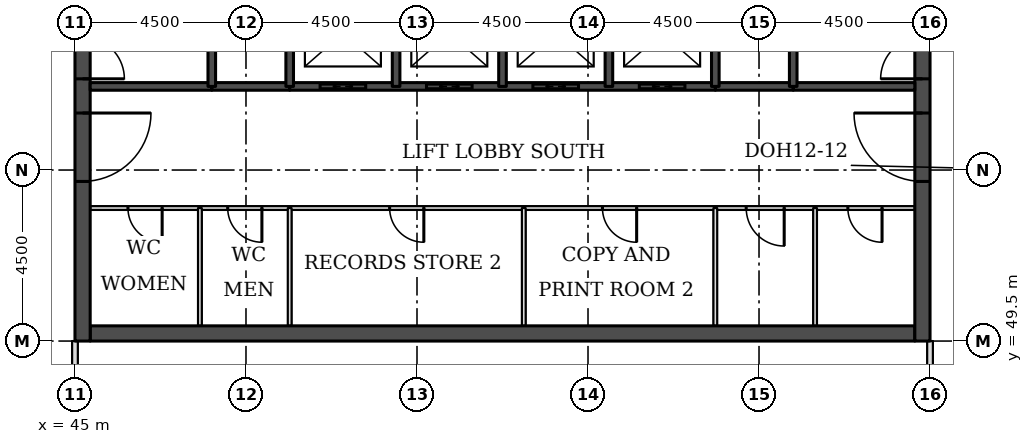
"""IFC4 building model, lengths in metres.
Left out: names, types, materials, properties, quantities, classifications, styles, units other than length and angle.
Written with IfcOpenShell. Run it as: python <this file> out.ifc"""

import sys

from ifc_helpers import new_model, si_unit, direction, frame, frame_2d, origin, place, context, subcontext, project, spatial, rectangle, extrude, element, fill, save


model = new_model("IFC4")
c1 = context("Model", 3, precision=1e-05, world=origin(), true_north=direction((0.0, 1.0)))
c2 = subcontext(c1, "Body", "Model", "MODEL_VIEW")
j1 = project(units=[si_unit("LENGTHUNIT", "METRE"), si_unit("PLANEANGLEUNIT", "RADIAN")], contexts=[c1])
p1 = place(None, origin())
s1 = spatial("IfcSite", under=j1, at=p1, CompositionType="ELEMENT")
p2 = place(p1, origin())
s2 = spatial("IfcBuilding", under=s1, at=p2, CompositionType="ELEMENT")
p3 = place(p2, frame((0.0, 0.0, 245.2)))
s3 = spatial("IfcBuildingStorey", under=s2, at=p3, CompositionType="ELEMENT", Elevation=245.2)
p4 = place(p3, frame((45.4, 49.7, 0.0), z_axis=(0.0, 0.0, 1.0), x_axis=(1.0, 0.0, 0.0)))
e1 = element("IfcWall", 1, at=p4, inside=s3, PredefinedType="SHEAR", context=c2, shape_type="SweptSolid", body=[
    extrude(rectangle(XDim=21.7, YDim=0.4, at=frame_2d((10.85, 0.0))), origin(), (0.0, 0.0, 1.0), 3.7),
])
p5 = place(p3, frame((45.2, 49.5, 0.0), z_axis=(0.0, 0.0, 1.0), x_axis=(0.0, 1.0, 0.0)))
e2 = element("IfcWall", 2, at=p5, inside=s3, PredefinedType="SHEAR", context=c2, shape_type="SweptSolid", body=[
    extrude(rectangle(XDim=22.5, YDim=0.4, at=frame_2d((11.25, 0.0))), origin(), (0.0, 0.0, 1.0), 3.7),
])
p6 = place(p5, frame((4.2, 0.0, 0.0)))
e3 = element("IfcOpeningElement", 3, at=p6, cuts=e2, PredefinedType="OPENING", context=c2, shape_type="SweptSolid", body=[
    extrude(rectangle(XDim=1.8, YDim=2.1, at=frame_2d((0.9, 1.05))), frame((0.0, 0.21, 0.0), z_axis=(0.0, -1.0, 0.0), x_axis=(1.0, 0.0, 0.0)), (0.0, 0.0, 1.0), 0.42),
])
p7 = place(p5, frame((6.9, 0.0, 0.0)))
e4 = element("IfcOpeningElement", 4, at=p7, cuts=e2, PredefinedType="OPENING", context=c2, shape_type="SweptSolid", body=[
    extrude(rectangle(XDim=1.1, YDim=2.1, at=frame_2d((0.55, 1.05))), frame((0.0, 0.21, 0.0), z_axis=(0.0, -1.0, 0.0), x_axis=(1.0, 0.0, 0.0)), (0.0, 0.0, 1.0), 0.42),
])
p8 = place(p5, frame((13.6, 0.0, 0.0)))
e5 = element("IfcOpeningElement", 5, at=p8, cuts=e2, PredefinedType="OPENING", context=c2, shape_type="SweptSolid", body=[
    extrude(rectangle(XDim=1.1, YDim=2.1, at=frame_2d((0.55, 1.05))), frame((0.0, 0.21, 0.0), z_axis=(0.0, -1.0, 0.0), x_axis=(1.0, 0.0, 0.0)), (0.0, 0.0, 1.0), 0.42),
])
p9 = place(p5, frame((16.5, 0.0, 0.0)))
e6 = element("IfcOpeningElement", 6, at=p9, cuts=e2, PredefinedType="OPENING", context=c2, shape_type="SweptSolid", body=[
    extrude(rectangle(XDim=1.8, YDim=2.1, at=frame_2d((0.9, 1.05))), frame((0.0, 0.21, 0.0), z_axis=(0.0, -1.0, 0.0), x_axis=(1.0, 0.0, 0.0)), (0.0, 0.0, 1.0), 0.42),
])
p10 = place(p3, frame((67.3, 49.5, 0.0), z_axis=(0.0, 0.0, 1.0), x_axis=(0.0, 1.0, 0.0)))
e7 = element("IfcWall", 7, at=p10, inside=s3, PredefinedType="SHEAR", context=c2, shape_type="SweptSolid", body=[
    extrude(rectangle(XDim=22.5, YDim=0.4, at=frame_2d((11.25, 0.0))), origin(), (0.0, 0.0, 1.0), 3.7),
])
p11 = place(p10, frame((4.2, 0.0, 0.0)))
e8 = element("IfcOpeningElement", 8, at=p11, cuts=e7, PredefinedType="OPENING", context=c2, shape_type="SweptSolid", body=[
    extrude(rectangle(XDim=1.8, YDim=2.1, at=frame_2d((0.9, 1.05))), frame((0.0, 0.21, 0.0), z_axis=(0.0, -1.0, 0.0), x_axis=(1.0, 0.0, 0.0)), (0.0, 0.0, 1.0), 0.42),
])
p12 = place(p10, frame((6.9, 0.0, 0.0)))
e9 = element("IfcOpeningElement", 9, at=p12, cuts=e7, PredefinedType="OPENING", context=c2, shape_type="SweptSolid", body=[
    extrude(rectangle(XDim=1.1, YDim=2.1, at=frame_2d((0.55, 1.05))), frame((0.0, 0.21, 0.0), z_axis=(0.0, -1.0, 0.0), x_axis=(1.0, 0.0, 0.0)), (0.0, 0.0, 1.0), 0.42),
])
p13 = place(p10, frame((13.6, 0.0, 0.0)))
e10 = element("IfcOpeningElement", 10, at=p13, cuts=e7, PredefinedType="OPENING", context=c2, shape_type="SweptSolid", body=[
    extrude(rectangle(XDim=1.1, YDim=2.1, at=frame_2d((0.55, 1.05))), frame((0.0, 0.21, 0.0), z_axis=(0.0, -1.0, 0.0), x_axis=(1.0, 0.0, 0.0)), (0.0, 0.0, 1.0), 0.42),
])
p14 = place(p10, frame((16.5, 0.0, 0.0)))
e11 = element("IfcOpeningElement", 11, at=p14, cuts=e7, PredefinedType="OPENING", context=c2, shape_type="SweptSolid", body=[
    extrude(rectangle(XDim=1.8, YDim=2.1, at=frame_2d((0.9, 1.05))), frame((0.0, 0.21, 0.0), z_axis=(0.0, -1.0, 0.0), x_axis=(1.0, 0.0, 0.0)), (0.0, 0.0, 1.0), 0.42),
])
p15 = place(p3, frame((67.5, 40.05, 0.0), z_axis=(0.0, 0.0, 1.0), x_axis=(0.0, 1.0, 0.0)))
e12 = element("IfcWall", 12, at=p15, inside=s3, PredefinedType="PARTITIONING", context=c2, shape_type="SweptSolid", body=[
    extrude(rectangle(XDim=9.45, YDim=0.15, at=frame_2d((4.725, 0.0))), origin(), (0.0, 0.0, 1.0), 3.022),
])
p16 = place(p3, frame((45.0, 48.0, 0.0), z_axis=(0.0, 0.0, 1.0), x_axis=(0.0, 1.0, 0.0)))
e13 = element("IfcWall", 13, at=p16, inside=s3, PredefinedType="PARTITIONING", context=c2, shape_type="SweptSolid", body=[
    extrude(rectangle(XDim=1.5, YDim=0.15, at=frame_2d((0.75, 0.0))), origin(), (0.0, 0.0, 1.0), 3.022),
])
p17 = place(p3, frame((45.4, 53.0, 0.0), z_axis=(0.0, 0.0, 1.0), x_axis=(1.0, 0.0, 0.0)))
e14 = element("IfcWall", 14, at=p17, inside=s3, PredefinedType="PARTITIONING", context=c2, shape_type="SweptSolid", body=[
    extrude(rectangle(XDim=21.7, YDim=0.1, at=frame_2d((10.85, 0.0))), origin(), (0.0, 0.0, 1.0), 3.55),
])
p18 = place(p17, frame((19.938, 0.0, 0.0)))
e15 = element("IfcOpeningElement", 15, at=p18, cuts=e14, PredefinedType="OPENING", context=c2, shape_type="SweptSolid", body=[
    extrude(rectangle(XDim=0.9, YDim=2.1, at=frame_2d((0.45, 1.05))), frame((0.0, 0.06, 0.0), z_axis=(0.0, -1.0, 0.0), x_axis=(1.0, 0.0, 0.0)), (0.0, 0.0, 1.0), 0.12),
])
p19 = place(p17, frame((17.262, 0.0, 0.0)))
e16 = element("IfcOpeningElement", 16, at=p19, cuts=e14, PredefinedType="OPENING", context=c2, shape_type="SweptSolid", body=[
    extrude(rectangle(XDim=1.0, YDim=2.1, at=frame_2d((0.5, 1.05))), frame((0.0, 0.06, 0.0), z_axis=(0.0, -1.0, 0.0), x_axis=(1.0, 0.0, 0.0)), (0.0, 0.0, 1.0), 0.12),
])
p20 = place(p17, frame((0.994, 0.0, 0.0)))
e17 = element("IfcOpeningElement", 17, at=p20, cuts=e14, PredefinedType="OPENING", context=c2, shape_type="SweptSolid", body=[
    extrude(rectangle(XDim=0.9, YDim=2.1, at=frame_2d((0.45, 1.05))), frame((0.0, 0.06, 0.0), z_axis=(0.0, -1.0, 0.0), x_axis=(1.0, 0.0, 0.0)), (0.0, 0.0, 1.0), 0.12),
])
p21 = place(p17, frame((3.619, 0.0, 0.0)))
e18 = element("IfcOpeningElement", 18, at=p21, cuts=e14, PredefinedType="OPENING", context=c2, shape_type="SweptSolid", body=[
    extrude(rectangle(XDim=0.9, YDim=2.1, at=frame_2d((0.45, 1.05))), frame((0.0, 0.06, 0.0), z_axis=(0.0, -1.0, 0.0), x_axis=(1.0, 0.0, 0.0)), (0.0, 0.0, 1.0), 0.12),
])
p22 = place(p17, frame((7.88, 0.0, 0.0)))
e19 = element("IfcOpeningElement", 19, at=p22, cuts=e14, PredefinedType="OPENING", context=c2, shape_type="SweptSolid", body=[
    extrude(rectangle(XDim=0.9, YDim=2.1, at=frame_2d((0.45, 1.05))), frame((0.0, 0.06, 0.0), z_axis=(0.0, -1.0, 0.0), x_axis=(1.0, 0.0, 0.0)), (0.0, 0.0, 1.0), 0.12),
])
p23 = place(p17, frame((13.48, 0.0, 0.0)))
e20 = element("IfcOpeningElement", 20, at=p23, cuts=e14, PredefinedType="OPENING", context=c2, shape_type="SweptSolid", body=[
    extrude(rectangle(XDim=0.9, YDim=2.1, at=frame_2d((0.45, 1.05))), frame((0.0, 0.06, 0.0), z_axis=(0.0, -1.0, 0.0), x_axis=(1.0, 0.0, 0.0)), (0.0, 0.0, 1.0), 0.12),
])
for number, where, z_axis, x_axis in (
    (21, (48.6, 56.2, 0.0), (0.0, 0.0, 1.0), (1.0, 0.0, 0.0)),
    (22, (61.85, 56.2, 0.0), (0.0, 0.0, 1.0), (1.0, 0.0, 0.0)),
):
    element("IfcWall", number, at=place(p3, frame(where, z_axis=z_axis, x_axis=x_axis)), inside=s3, PredefinedType="SOLIDWALL", context=c2, shape_type="SweptSolid", body=[
        extrude(rectangle(XDim=2.05, YDim=0.2, at=frame_2d((1.025, 0.0))), origin(), (0.0, 0.0, 1.0), 3.55),
    ])
p24 = place(p3, frame((45.4, 56.2, 0.0), z_axis=(0.0, 0.0, 1.0), x_axis=(1.0, 0.0, 0.0)))
e23 = element("IfcWall", 23, at=p24, inside=s3, PredefinedType="SOLIDWALL", context=c2, shape_type="SweptSolid", body=[
    extrude(rectangle(XDim=3.2, YDim=0.2, at=frame_2d((1.6, 0.0))), origin(), (0.0, 0.0, 1.0), 3.55),
])
p25 = place(p3, frame((50.65, 56.2, 0.0), z_axis=(0.0, 0.0, 1.0), x_axis=(1.0, 0.0, 0.0)))
e24 = element("IfcWall", 24, at=p25, inside=s3, PredefinedType="SOLIDWALL", context=c2, shape_type="SweptSolid", body=[
    extrude(rectangle(XDim=11.2, YDim=0.2, at=frame_2d((5.6, 0.0))), origin(), (0.0, 0.0, 1.0), 3.55),
])
p26 = place(p25, frame((0.8, 0.0, 0.0)))
e25 = element("IfcOpeningElement", 25, at=p26, cuts=e24, PredefinedType="OPENING", context=c2, shape_type="SweptSolid", body=[
    extrude(rectangle(XDim=1.2, YDim=2.1, at=frame_2d((0.6, 1.05))), frame((0.0, 0.11, 0.0), z_axis=(0.0, -1.0, 0.0), x_axis=(1.0, 0.0, 0.0)), (0.0, 0.0, 1.0), 0.22),
])
p27 = place(p25, frame((3.6, 0.0, 0.0)))
e26 = element("IfcOpeningElement", 26, at=p27, cuts=e24, PredefinedType="OPENING", context=c2, shape_type="SweptSolid", body=[
    extrude(rectangle(XDim=1.2, YDim=2.1, at=frame_2d((0.6, 1.05))), frame((0.0, 0.11, 0.0), z_axis=(0.0, -1.0, 0.0), x_axis=(1.0, 0.0, 0.0)), (0.0, 0.0, 1.0), 0.22),
])
p28 = place(p25, frame((6.4, 0.0, 0.0)))
e27 = element("IfcOpeningElement", 27, at=p28, cuts=e24, PredefinedType="OPENING", context=c2, shape_type="SweptSolid", body=[
    extrude(rectangle(XDim=1.2, YDim=2.1, at=frame_2d((0.6, 1.05))), frame((0.0, 0.11, 0.0), z_axis=(0.0, -1.0, 0.0), x_axis=(1.0, 0.0, 0.0)), (0.0, 0.0, 1.0), 0.22),
])
p29 = place(p25, frame((9.2, 0.0, 0.0)))
e28 = element("IfcOpeningElement", 28, at=p29, cuts=e24, PredefinedType="OPENING", context=c2, shape_type="SweptSolid", body=[
    extrude(rectangle(XDim=1.2, YDim=2.1, at=frame_2d((0.6, 1.05))), frame((0.0, 0.11, 0.0), z_axis=(0.0, -1.0, 0.0), x_axis=(1.0, 0.0, 0.0)), (0.0, 0.0, 1.0), 0.22),
])
p30 = place(p3, frame((63.9, 56.2, 0.0), z_axis=(0.0, 0.0, 1.0), x_axis=(1.0, 0.0, 0.0)))
e29 = element("IfcWall", 29, at=p30, inside=s3, PredefinedType="SOLIDWALL", context=c2, shape_type="SweptSolid", body=[
    extrude(rectangle(XDim=3.2, YDim=0.2, at=frame_2d((1.6, 0.0))), origin(), (0.0, 0.0, 1.0), 3.55),
])
p31 = place(p3, frame((48.288, 49.9, 0.0), z_axis=(0.0, 0.0, 1.0), x_axis=(0.0, 1.0, 0.0)))
e30 = element("IfcWall", 30, at=p31, inside=s3, PredefinedType="PARTITIONING", context=c2, shape_type="SweptSolid", body=[
    extrude(rectangle(XDim=3.1, YDim=0.1, at=frame_2d((1.55, 0.0))), origin(), (0.0, 0.0, 1.0), 3.55),
])
p32 = place(p3, frame((48.6, 56.2, 0.0), z_axis=(0.0, 0.0, 1.0), x_axis=(0.0, 1.0, 0.0)))
e31 = element("IfcWall", 31, at=p32, inside=s3, PredefinedType="SOLIDWALL", context=c2, shape_type="SweptSolid", body=[
    extrude(rectangle(XDim=5.8, YDim=0.2, at=frame_2d((2.9, 0.0))), origin(), (0.0, 0.0, 1.0), 3.55),
])
p33 = place(p3, frame((50.65, 49.9, 0.0), z_axis=(0.0, 0.0, 1.0), x_axis=(0.0, 1.0, 0.0)))
e32 = element("IfcWall", 32, at=p33, inside=s3, PredefinedType="PARTITIONING", context=c2, shape_type="SweptSolid", body=[
    extrude(rectangle(XDim=3.1, YDim=0.1, at=frame_2d((1.55, 0.0))), origin(), (0.0, 0.0, 1.0), 3.55),
])
for number, where, z_axis, x_axis in (
    (33, (50.65, 56.2, 0.0), (0.0, 0.0, 1.0), (0.0, 1.0, 0.0)),
    (34, (53.45, 56.2, 0.0), (0.0, 0.0, 1.0), (0.0, 1.0, 0.0)),
    (35, (56.25, 56.2, 0.0), (0.0, 0.0, 1.0), (0.0, 1.0, 0.0)),
):
    element("IfcWall", number, at=place(p3, frame(where, z_axis=z_axis, x_axis=x_axis)), inside=s3, PredefinedType="SOLIDWALL", context=c2, shape_type="SweptSolid", body=[
        extrude(rectangle(XDim=2.8, YDim=0.2, at=frame_2d((1.4, 0.0))), origin(), (0.0, 0.0, 1.0), 3.55),
    ])
p34 = place(p3, frame((56.81, 49.9, 0.0), z_axis=(0.0, 0.0, 1.0), x_axis=(0.0, 1.0, 0.0)))
e36 = element("IfcWall", 36, at=p34, inside=s3, PredefinedType="PARTITIONING", context=c2, shape_type="SweptSolid", body=[
    extrude(rectangle(XDim=3.1, YDim=0.1, at=frame_2d((1.55, 0.0))), origin(), (0.0, 0.0, 1.0), 3.55),
])
p35 = place(p3, frame((59.05, 56.2, 0.0), z_axis=(0.0, 0.0, 1.0), x_axis=(0.0, 1.0, 0.0)))
e37 = element("IfcWall", 37, at=p35, inside=s3, PredefinedType="SOLIDWALL", context=c2, shape_type="SweptSolid", body=[
    extrude(rectangle(XDim=2.8, YDim=0.2, at=frame_2d((1.4, 0.0))), origin(), (0.0, 0.0, 1.0), 3.55),
])
p36 = place(p3, frame((61.85, 49.9, 0.0), z_axis=(0.0, 0.0, 1.0), x_axis=(0.0, 1.0, 0.0)))
e38 = element("IfcWall", 38, at=p36, inside=s3, PredefinedType="PARTITIONING", context=c2, shape_type="SweptSolid", body=[
    extrude(rectangle(XDim=3.1, YDim=0.1, at=frame_2d((1.55, 0.0))), origin(), (0.0, 0.0, 1.0), 3.55),
])
p37 = place(p3, frame((61.85, 56.2, 0.0), z_axis=(0.0, 0.0, 1.0), x_axis=(0.0, 1.0, 0.0)))
e39 = element("IfcWall", 39, at=p37, inside=s3, PredefinedType="SOLIDWALL", context=c2, shape_type="SweptSolid", body=[
    extrude(rectangle(XDim=2.8, YDim=0.2, at=frame_2d((1.4, 0.0))), origin(), (0.0, 0.0, 1.0), 3.55),
])
p38 = place(p3, frame((63.9, 56.2, 0.0), z_axis=(0.0, 0.0, 1.0), x_axis=(0.0, 1.0, 0.0)))
e40 = element("IfcWall", 40, at=p38, inside=s3, PredefinedType="SOLIDWALL", context=c2, shape_type="SweptSolid", body=[
    extrude(rectangle(XDim=5.8, YDim=0.2, at=frame_2d((2.9, 0.0))), origin(), (0.0, 0.0, 1.0), 3.55),
])
p39 = place(p3, frame((64.475, 49.9, 0.0), z_axis=(0.0, 0.0, 1.0), x_axis=(0.0, 1.0, 0.0)))
e41 = element("IfcWall", 41, at=p39, inside=s3, PredefinedType="PARTITIONING", context=c2, shape_type="SweptSolid", body=[
    extrude(rectangle(XDim=3.1, YDim=0.1, at=frame_2d((1.55, 0.0))), origin(), (0.0, 0.0, 1.0), 3.55),
])
p40 = place(p26, origin())
e42 = element("IfcDoor", 42, at=p40, inside=s3, OperationType="DOUBLE_DOOR_SLIDING", PredefinedType="DOOR", context=c2, shape_type="SweptSolid", body=[
    extrude(rectangle(XDim=1.2, YDim=2.1, at=frame_2d((0.6, 1.05))), frame((0.0, 0.025, 0.0), z_axis=(0.0, -1.0, 0.0), x_axis=(1.0, 0.0, 0.0)), (0.0, 0.0, 1.0), 0.05),
])
fill(e25, e42)
p41 = place(p27, origin())
e43 = element("IfcDoor", 43, at=p41, inside=s3, OperationType="DOUBLE_DOOR_SLIDING", PredefinedType="DOOR", context=c2, shape_type="SweptSolid", body=[
    extrude(rectangle(XDim=1.2, YDim=2.1, at=frame_2d((0.6, 1.05))), frame((0.0, 0.025, 0.0), z_axis=(0.0, -1.0, 0.0), x_axis=(1.0, 0.0, 0.0)), (0.0, 0.0, 1.0), 0.05),
])
fill(e26, e43)
p42 = place(p28, origin())
e44 = element("IfcDoor", 44, at=p42, inside=s3, OperationType="DOUBLE_DOOR_SLIDING", PredefinedType="DOOR", context=c2, shape_type="SweptSolid", body=[
    extrude(rectangle(XDim=1.2, YDim=2.1, at=frame_2d((0.6, 1.05))), frame((0.0, 0.025, 0.0), z_axis=(0.0, -1.0, 0.0), x_axis=(1.0, 0.0, 0.0)), (0.0, 0.0, 1.0), 0.05),
])
fill(e27, e44)
p43 = place(p29, origin())
e45 = element("IfcDoor", 45, at=p43, inside=s3, OperationType="DOUBLE_DOOR_SLIDING", PredefinedType="DOOR", context=c2, shape_type="SweptSolid", body=[
    extrude(rectangle(XDim=1.2, YDim=2.1, at=frame_2d((0.6, 1.05))), frame((0.0, 0.025, 0.0), z_axis=(0.0, -1.0, 0.0), x_axis=(1.0, 0.0, 0.0)), (0.0, 0.0, 1.0), 0.05),
])
fill(e28, e45)
p44 = place(p6, frame((1.8, 0.0, 0.0), z_axis=(0.0, 0.0, 1.0), x_axis=(-1.0, 0.0, 0.0)))
e46 = element("IfcDoor", 46, at=p44, inside=s3, OperationType="SINGLE_SWING_LEFT", PredefinedType="DOOR", context=c2, shape_type="SweptSolid", body=[
    extrude(rectangle(XDim=1.8, YDim=2.1, at=frame_2d((0.9, 1.05))), frame((0.0, 0.025, 0.0), z_axis=(0.0, -1.0, 0.0), x_axis=(1.0, 0.0, 0.0)), (0.0, 0.0, 1.0), 0.05),
])
fill(e3, e46)
p45 = place(p7, frame((1.1, 0.0, 0.0), z_axis=(0.0, 0.0, 1.0), x_axis=(-1.0, 0.0, 0.0)))
e47 = element("IfcDoor", 47, at=p45, inside=s3, OperationType="SINGLE_SWING_RIGHT", PredefinedType="DOOR", context=c2, shape_type="SweptSolid", body=[
    extrude(rectangle(XDim=1.1, YDim=2.1, at=frame_2d((0.55, 1.05))), frame((0.0, 0.025, 0.0), z_axis=(0.0, -1.0, 0.0), x_axis=(1.0, 0.0, 0.0)), (0.0, 0.0, 1.0), 0.05),
])
fill(e4, e47)
p46 = place(p11, origin())
e48 = element("IfcDoor", 48, at=p46, inside=s3, OperationType="SINGLE_SWING_RIGHT", PredefinedType="DOOR", context=c2, shape_type="SweptSolid", body=[
    extrude(rectangle(XDim=1.8, YDim=2.1, at=frame_2d((0.9, 1.05))), frame((0.0, 0.025, 0.0), z_axis=(0.0, -1.0, 0.0), x_axis=(1.0, 0.0, 0.0)), (0.0, 0.0, 1.0), 0.05),
])
fill(e8, e48)
p47 = place(p12, origin())
e49 = element("IfcDoor", 49, at=p47, inside=s3, OperationType="SINGLE_SWING_LEFT", PredefinedType="DOOR", context=c2, shape_type="SweptSolid", body=[
    extrude(rectangle(XDim=1.1, YDim=2.1, at=frame_2d((0.55, 1.05))), frame((0.0, 0.025, 0.0), z_axis=(0.0, -1.0, 0.0), x_axis=(1.0, 0.0, 0.0)), (0.0, 0.0, 1.0), 0.05),
])
fill(e9, e49)
p48 = place(p18, frame((0.9, 0.0, 0.0), z_axis=(0.0, 0.0, 1.0), x_axis=(-1.0, 0.0, 0.0)))
e50 = element("IfcDoor", 50, at=p48, inside=s3, OperationType="SINGLE_SWING_LEFT", PredefinedType="DOOR", context=c2, shape_type="SweptSolid", body=[
    extrude(rectangle(XDim=0.9, YDim=2.1, at=frame_2d((0.45, 1.05))), frame((0.0, 0.025, 0.0), z_axis=(0.0, -1.0, 0.0), x_axis=(1.0, 0.0, 0.0)), (0.0, 0.0, 1.0), 0.05),
])
fill(e15, e50)
p49 = place(p19, frame((1.0, 0.0, 0.0), z_axis=(0.0, 0.0, 1.0), x_axis=(-1.0, 0.0, 0.0)))
e51 = element("IfcDoor", 51, at=p49, inside=s3, OperationType="SINGLE_SWING_LEFT", PredefinedType="DOOR", context=c2, shape_type="SweptSolid", body=[
    extrude(rectangle(XDim=1.0, YDim=2.1, at=frame_2d((0.5, 1.05))), frame((0.0, 0.025, 0.0), z_axis=(0.0, -1.0, 0.0), x_axis=(1.0, 0.0, 0.0)), (0.0, 0.0, 1.0), 0.05),
])
fill(e16, e51)
p50 = place(p20, frame((0.9, 0.0, 0.0), z_axis=(0.0, 0.0, 1.0), x_axis=(-1.0, 0.0, 0.0)))
e52 = element("IfcDoor", 52, at=p50, inside=s3, OperationType="SINGLE_SWING_LEFT", PredefinedType="DOOR", context=c2, shape_type="SweptSolid", body=[
    extrude(rectangle(XDim=0.9, YDim=2.1, at=frame_2d((0.45, 1.05))), frame((0.0, 0.025, 0.0), z_axis=(0.0, -1.0, 0.0), x_axis=(1.0, 0.0, 0.0)), (0.0, 0.0, 1.0), 0.05),
])
fill(e17, e52)
p51 = place(p21, frame((0.9, 0.0, 0.0), z_axis=(0.0, 0.0, 1.0), x_axis=(-1.0, 0.0, 0.0)))
e53 = element("IfcDoor", 53, at=p51, inside=s3, OperationType="SINGLE_SWING_LEFT", PredefinedType="DOOR", context=c2, shape_type="SweptSolid", body=[
    extrude(rectangle(XDim=0.9, YDim=2.1, at=frame_2d((0.45, 1.05))), frame((0.0, 0.025, 0.0), z_axis=(0.0, -1.0, 0.0), x_axis=(1.0, 0.0, 0.0)), (0.0, 0.0, 1.0), 0.05),
])
fill(e18, e53)
p52 = place(p22, frame((0.9, 0.0, 0.0), z_axis=(0.0, 0.0, 1.0), x_axis=(-1.0, 0.0, 0.0)))
e54 = element("IfcDoor", 54, at=p52, inside=s3, OperationType="SINGLE_SWING_LEFT", PredefinedType="DOOR", context=c2, shape_type="SweptSolid", body=[
    extrude(rectangle(XDim=0.9, YDim=2.1, at=frame_2d((0.45, 1.05))), frame((0.0, 0.025, 0.0), z_axis=(0.0, -1.0, 0.0), x_axis=(1.0, 0.0, 0.0)), (0.0, 0.0, 1.0), 0.05),
])
fill(e19, e54)
p53 = place(p23, frame((0.9, 0.0, 0.0), z_axis=(0.0, 0.0, 1.0), x_axis=(-1.0, 0.0, 0.0)))
e55 = element("IfcDoor", 55, at=p53, inside=s3, OperationType="SINGLE_SWING_LEFT", PredefinedType="DOOR", context=c2, shape_type="SweptSolid", body=[
    extrude(rectangle(XDim=0.9, YDim=2.1, at=frame_2d((0.45, 1.05))), frame((0.0, 0.025, 0.0), z_axis=(0.0, -1.0, 0.0), x_axis=(1.0, 0.0, 0.0)), (0.0, 0.0, 1.0), 0.05),
])
fill(e20, e55)
save(model, sys.argv[1])
